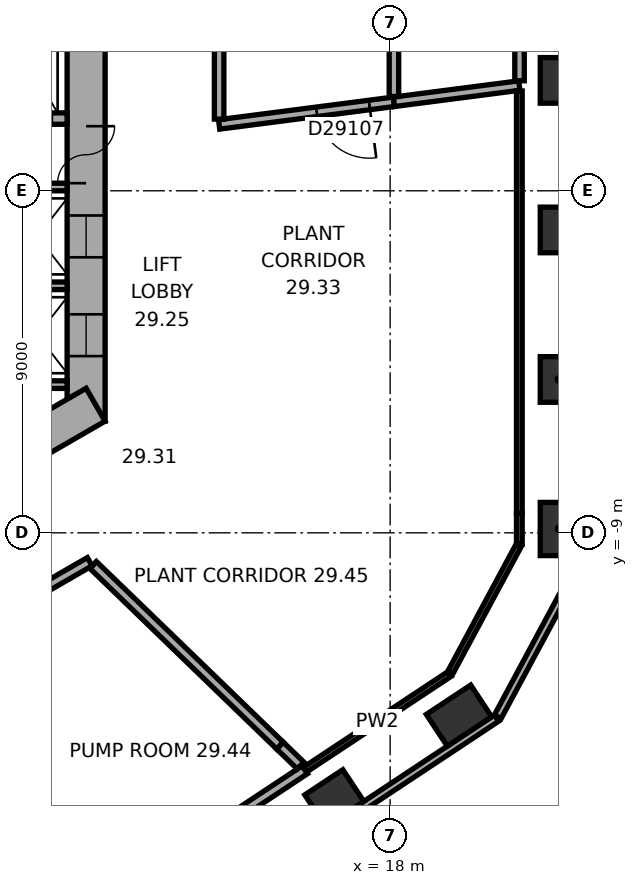
"""IFC4 building model, lengths in metres.
Left out: names, types, materials, properties, quantities, classifications, styles, units other than length and angle.
Written with IfcOpenShell. Run it as: python <this file> out.ifc"""

import sys

from ifc_helpers import new_model, si_unit, direction, frame, frame_2d, origin, origin_2d, place, context, subcontext, project, spatial, rectangle, extrude, element, fill, save


model = new_model("IFC4")
c1 = context("Model", 3, precision=1e-05, world=origin(), true_north=direction((0.0, 1.0)))
c2 = subcontext(c1, "Body", "Model", "MODEL_VIEW")
j1 = project(units=[si_unit("LENGTHUNIT", "METRE"), si_unit("PLANEANGLEUNIT", "RADIAN")], contexts=[c1])
p1 = place(None, origin())
s1 = spatial("IfcSite", under=j1, at=p1, CompositionType="ELEMENT")
p2 = place(p1, origin())
s2 = spatial("IfcBuilding", under=s1, at=p2, CompositionType="ELEMENT")
p3 = place(p2, frame((0.0, 0.0, 119.9)))
s3 = spatial("IfcBuildingStorey", under=s2, at=p3, CompositionType="ELEMENT", Elevation=119.9)
p4 = place(p3, frame((22.45, -8.899, 0.0), z_axis=(0.0, 0.0, 1.0), x_axis=(0.0, 1.0, 0.0)))
e1 = element("IfcColumn", 1, at=p4, inside=s3, PredefinedType="COLUMN", context=c2, shape_type="SweptSolid", body=[
    extrude(rectangle(XDim=1.4, YDim=1.0, at=origin_2d()), origin(), (0.0, 0.0, 1.0), 4.5),
])
for number, where, z_axis, x_axis in (
    (2, (22.45, -4.965, 0.0), (0.0, 0.0, 1.0), (0.0, 1.0, 0.0)),
    (3, (22.45, -1.03, 0.0), (0.0, 0.0, 1.0), (0.0, 1.0, 0.0)),
    (4, (22.45, 2.905, 0.0), (0.0, 0.0, 1.0), (0.0, 1.0, 0.0)),
    (5, (16.531, -15.981, 0.0), (0.0, 0.0, 1.0), (0.834, 0.552, 0.0)),
):
    element("IfcColumn", number, at=place(p3, frame(where, z_axis=z_axis, x_axis=x_axis)), inside=s3, PredefinedType="COLUMN", context=c2, shape_type="SweptSolid", body=[
        extrude(rectangle(XDim=1.2, YDim=1.0, at=origin_2d()), origin(), (0.0, 0.0, 1.0), 4.5),
    ])
p5 = place(p3, frame((19.812, -13.809, 0.0), z_axis=(0.0, 0.0, 1.0), x_axis=(0.833885822067, 0.551936985312, 0.0)))
e6 = element("IfcColumn", 6, at=p5, inside=s3, PredefinedType="COLUMN", context=c2, shape_type="SweptSolid", body=[
    extrude(rectangle(XDim=1.4, YDim=1.0, at=origin_2d()), origin(), (0.0, 0.0, 1.0), 4.5),
])
p6 = place(p3, frame((10.0, -6.062, 0.0), z_axis=(0.0, 0.0, 1.0), x_axis=(0.0, 1.0, 0.0)))
e7 = element("IfcWall", 7, at=p6, inside=s3, PredefinedType="SHEAR", context=c2, shape_type="SweptSolid", body=[
    extrude(rectangle(XDim=12.125, YDim=1.0, at=frame_2d((6.062, 0.0))), origin(), (0.0, 0.0, 1.0), 4.5),
])
p7 = place(p6, frame((6.262, 0.0, 0.0)))
e8 = element("IfcOpeningElement", 8, at=p7, cuts=e7, PredefinedType="OPENING", context=c2, shape_type="SweptSolid", body=[
    extrude(rectangle(XDim=1.5, YDim=2.1, at=frame_2d((0.75, 1.05))), frame((0.0, 0.51, 0.0), z_axis=(0.0, -1.0, 0.0), x_axis=(1.0, 0.0, 0.0)), (0.0, 0.0, 1.0), 1.02),
])
p8 = place(p6, frame((1.712, 0.0, 0.0)))
e9 = element("IfcOpeningElement", 9, at=p8, cuts=e7, PredefinedType="OPENING", context=c2, shape_type="SweptSolid", body=[
    extrude(rectangle(XDim=1.1, YDim=2.1, at=frame_2d((0.55, 1.05))), frame((0.0, 0.51, 0.0), z_axis=(0.0, -1.0, 0.0), x_axis=(1.0, 0.0, 0.0)), (0.0, 0.0, 1.0), 1.02),
])
p9 = place(p6, frame((4.312, 0.0, 0.0)))
e10 = element("IfcOpeningElement", 10, at=p9, cuts=e7, PredefinedType="OPENING", context=c2, shape_type="SweptSolid", body=[
    extrude(rectangle(XDim=1.1, YDim=2.1, at=frame_2d((0.55, 1.05))), frame((0.0, 0.51, 0.0), z_axis=(0.0, -1.0, 0.0), x_axis=(1.0, 0.0, 0.0)), (0.0, 0.0, 1.0), 1.02),
])
p10 = place(p3, frame((-0.25, -11.691, 0.0), z_axis=(0.0, 0.0, 1.0), x_axis=(0.866022616891, 0.50000482701, 0.0)))
e11 = element("IfcWall", 11, at=p10, inside=s3, PredefinedType="SHEAR", context=c2, shape_type="SweptSolid", body=[
    extrude(rectangle(XDim=12.125, YDim=1.0, at=frame_2d((6.062, 0.0))), origin(), (0.0, 0.0, 1.0), 4.5),
])
p11 = place(p10, frame((2.712, 0.0, 0.0)))
e12 = element("IfcOpeningElement", 12, at=p11, cuts=e11, PredefinedType="OPENING", context=c2, shape_type="SweptSolid", body=[
    extrude(rectangle(XDim=0.9, YDim=2.1, at=frame_2d((0.45, 1.05))), frame((0.0, 0.51, 0.0), z_axis=(0.0, -1.0, 0.0), x_axis=(1.0, 0.0, 0.0)), (0.0, 0.0, 1.0), 1.02),
])
p12 = place(p10, frame((5.312, 0.0, 0.0)))
e13 = element("IfcOpeningElement", 13, at=p12, cuts=e11, PredefinedType="OPENING", context=c2, shape_type="SweptSolid", body=[
    extrude(rectangle(XDim=0.9, YDim=2.1, at=frame_2d((0.45, 1.05))), frame((0.0, 0.51, 0.0), z_axis=(0.0, -1.0, 0.0), x_axis=(1.0, 0.0, 0.0)), (0.0, 0.0, 1.0), 1.02),
])
p13 = place(p10, frame((7.812, 0.0, 0.0)))
e14 = element("IfcOpeningElement", 14, at=p13, cuts=e11, PredefinedType="OPENING", context=c2, shape_type="SweptSolid", body=[
    extrude(rectangle(XDim=1.1, YDim=2.1, at=frame_2d((0.55, 1.05))), frame((0.0, 0.51, 0.0), z_axis=(0.0, -1.0, 0.0), x_axis=(1.0, 0.0, 0.0)), (0.0, 0.0, 1.0), 1.02),
])
p14 = place(p3, frame((3.083, -25.601, 0.0), z_axis=(0.0, 0.0, 1.0), x_axis=(0.833884295743, 0.551939291329, 0.0)))
e15 = element("IfcWall", 15, at=p14, inside=s3, PredefinedType="STANDARD", context=c2, shape_type="SweptSolid", body=[
    extrude(rectangle(XDim=21.246, YDim=0.2, at=frame_2d((10.623, 0.0))), origin(), (0.0, 0.0, 1.0), 4.5),
])
p15 = place(p3, frame((20.833, -13.839, 0.0), z_axis=(0.0, 0.0, 1.0), x_axis=(0.473321668581, 0.880889662813, 0.0)))
e16 = element("IfcWall", 16, at=p15, inside=s3, PredefinedType="STANDARD", context=c2, shape_type="SweptSolid", body=[
    extrude(rectangle(XDim=4.66, YDim=0.2, at=frame_2d((2.33, 0.0))), origin(), (0.0, 0.0, 1.0), 4.5),
])
for number, where, z_axis, x_axis in (
    (17, (7.3, -5.1, 0.0), (0.0, 0.0, 1.0), (1.0, 0.0, 0.0)),
    (18, (7.3, -2.5, 0.0), (0.0, 0.0, 1.0), (1.0, 0.0, 0.0)),
    (19, (7.3, 0.1, 0.0), (0.0, 0.0, 1.0), (1.0, 0.0, 0.0)),
):
    element("IfcWall", number, at=place(p3, frame(where, z_axis=z_axis, x_axis=x_axis)), inside=s3, PredefinedType="PARTITIONING", context=c2, shape_type="SweptSolid", body=[
        extrude(rectangle(XDim=2.2, YDim=0.2, at=frame_2d((1.1, 0.0))), origin(), (0.0, 0.0, 1.0), 4.22),
    ])
p16 = place(p3, frame((7.3, 1.9, 0.0), z_axis=(0.0, 0.0, 1.0), x_axis=(1.0, 0.0, 0.0)))
e20 = element("IfcWall", 20, at=p16, inside=s3, PredefinedType="SHEAR", context=c2, shape_type="SweptSolid", body=[
    extrude(rectangle(XDim=2.2, YDim=0.3, at=frame_2d((1.1, 0.0))), origin(), (0.0, 0.0, 1.0), 4.22),
])
p17 = place(p16, frame((0.7, 0.0, 0.0)))
e21 = element("IfcOpeningElement", 21, at=p17, cuts=e20, PredefinedType="OPENING", context=c2, shape_type="SweptSolid", body=[
    extrude(rectangle(XDim=1.1, YDim=2.1, at=frame_2d((0.55, 1.05))), frame((0.0, 0.16, 0.0), z_axis=(0.0, -1.0, 0.0), x_axis=(1.0, 0.0, 0.0)), (0.0, 0.0, 1.0), 0.32),
])
p18 = place(p3, frame((15.758, -15.233, 0.0), z_axis=(0.0, 0.0, 1.0), x_axis=(-0.83385397802, -0.551985093403, 0.0)))
e22 = element("IfcWall", 22, at=p18, inside=s3, PredefinedType="SOLIDWALL", context=c2, shape_type="SweptSolid", body=[
    extrude(rectangle(XDim=7.499, YDim=0.25, at=frame_2d((3.75, 0.0))), origin(), (0.0, 0.0, 1.0), 3.72),
])
p19 = place(p3, frame((15.101, -14.598, 0.0), z_axis=(0.0, 0.0, 1.0), x_axis=(0.718831874795, -0.695183958229, 0.0)))
e23 = element("IfcWall", 23, at=p19, inside=s3, PredefinedType="SOLIDWALL", context=c2, shape_type="SweptSolid", body=[
    extrude(rectangle(XDim=0.754, YDim=0.25, at=frame_2d((0.377, 0.0))), origin(), (0.0, 0.0, 1.0), 3.2),
])
p20 = place(p3, frame((15.101, -14.598, 0.0), z_axis=(0.0, 0.0, 1.0), x_axis=(-0.718943789633, 0.695068217766, 0.0)))
e24 = element("IfcWall", 24, at=p20, inside=s3, PredefinedType="SOLIDWALL", context=c2, shape_type="SweptSolid", body=[
    extrude(rectangle(XDim=6.841, YDim=0.25, at=frame_2d((3.42, 0.0))), origin(), (0.0, 0.0, 1.0), 3.2),
])
p21 = place(p3, frame((19.563, -12.714, 0.0), z_axis=(0.0, 0.0, 1.0), x_axis=(-0.833913741114, -0.551894801916, 0.0)))
e25 = element("IfcWall", 25, at=p21, inside=s3, PredefinedType="PARTITIONING", context=c2, shape_type="SweptSolid", body=[
    extrude(rectangle(XDim=4.564, YDim=0.15, at=frame_2d((2.282, 0.0))), origin(), (0.0, 0.0, 1.0), 3.72),
])
p22 = place(p3, frame((7.269, -11.391, 0.0), z_axis=(0.0, 0.0, 1.0), x_axis=(0.866043587326, 0.49996850386, 0.0)))
e26 = element("IfcWall", 26, at=p22, inside=s3, PredefinedType="SOLIDWALL", context=c2, shape_type="SweptSolid", body=[
    extrude(rectangle(XDim=3.264, YDim=0.25, at=frame_2d((1.632, 0.0))), origin(), (0.0, 0.0, 1.0), 4.22),
])
p23 = place(p22, frame((0.25, 0.0, 0.0)))
e27 = element("IfcOpeningElement", 27, at=p23, cuts=e26, PredefinedType="OPENING", context=c2, shape_type="SweptSolid", body=[
    extrude(rectangle(XDim=1.4, YDim=2.1, at=frame_2d((0.7, 1.05))), frame((0.0, 0.135, 0.0), z_axis=(0.0, -1.0, 0.0), x_axis=(1.0, 0.0, 0.0)), (0.0, 0.0, 1.0), 0.27),
])
p24 = place(p3, frame((21.381, -9.332, 0.0), z_axis=(0.0, 0.0, 1.0), x_axis=(-0.473363971323, -0.880866931297, 0.0)))
e28 = element("IfcWall", 28, at=p24, inside=s3, PredefinedType="PARTITIONING", context=c2, shape_type="SweptSolid", body=[
    extrude(rectangle(XDim=3.8, YDim=0.15, at=frame_2d((1.9, 0.0))), origin(), (0.0, 0.0, 1.0), 4.22),
])
p25 = place(p3, frame((21.4, -8.483, 0.0), z_axis=(0.0, 0.0, 1.0), x_axis=(0.0, -1.0, 0.0)))
e29 = element("IfcWall", 29, at=p25, inside=s3, PredefinedType="PARTITIONING", context=c2, shape_type="SweptSolid", body=[
    extrude(rectangle(XDim=0.813, YDim=0.15, at=frame_2d((0.407, 0.0))), origin(), (0.0, 0.0, 1.0), 4.22),
])
p26 = place(p3, frame((18.1, 2.342, 0.0), z_axis=(0.0, 0.0, 1.0), x_axis=(-0.991739248087, -0.128270276382, 0.0)))
e30 = element("IfcWall", 30, at=p26, inside=s3, PredefinedType="SOLIDWALL", context=c2, shape_type="SweptSolid", body=[
    extrude(rectangle(XDim=4.638, YDim=0.25, at=frame_2d((2.319, 0.0))), origin(), (0.0, 0.0, 1.0), 3.2),
])
p27 = place(p26, frame((0.65, 0.0, 0.0)))
e31 = element("IfcOpeningElement", 31, at=p27, cuts=e30, PredefinedType="OPENING", context=c2, shape_type="SweptSolid", body=[
    extrude(rectangle(XDim=1.4, YDim=2.1, at=frame_2d((0.7, 1.05))), frame((0.0, 0.135, 0.0), z_axis=(0.0, -1.0, 0.0), x_axis=(1.0, 0.0, 0.0)), (0.0, 0.0, 1.0), 0.27),
])
p28 = place(p3, frame((18.1, 2.342, 0.0), z_axis=(0.0, 0.0, 1.0), x_axis=(0.99173002922, 0.128341533193, 0.0)))
e32 = element("IfcWall", 32, at=p28, inside=s3, PredefinedType="SOLIDWALL", context=c2, shape_type="SweptSolid", body=[
    extrude(rectangle(XDim=3.327, YDim=0.25, at=frame_2d((1.664, 0.0))), origin(), (0.0, 0.0, 1.0), 3.2),
])
p29 = place(p3, frame((21.4, 2.626, 0.0), z_axis=(0.0, 0.0, 1.0), x_axis=(0.0, -1.0, 0.0)))
e33 = element("IfcWall", 33, at=p29, inside=s3, PredefinedType="PARTITIONING", context=c2, shape_type="SweptSolid", body=[
    extrude(rectangle(XDim=11.109, YDim=0.15, at=frame_2d((5.554, 0.0))), origin(), (0.0, 0.0, 1.0), 3.72),
])
p30 = place(p3, frame((13.5, 7.694, 0.0), z_axis=(0.0, 0.0, 1.0), x_axis=(0.0, -1.0, 0.0)))
e34 = element("IfcWall", 34, at=p30, inside=s3, PredefinedType="SOLIDWALL", context=c2, shape_type="SweptSolid", body=[
    extrude(rectangle(XDim=5.808, YDim=0.25, at=frame_2d((2.904, 0.0))), origin(), (0.0, 0.0, 1.0), 4.22),
])
p31 = place(p3, frame((18.1, 10.35, 0.0), z_axis=(0.0, 0.0, 1.0), x_axis=(0.0, -1.0, 0.0)))
e35 = element("IfcWall", 35, at=p31, inside=s3, PredefinedType="SOLIDWALL", context=c2, shape_type="SweptSolid", body=[
    extrude(rectangle(XDim=7.868, YDim=0.25, at=frame_2d((3.934, 0.0))), origin(), (0.0, 0.0, 1.0), 4.22),
])
p32 = place(p3, frame((21.405, 11.117, 0.0), z_axis=(0.0, 0.0, 1.0), x_axis=(0.0, -1.0, 0.0)))
e36 = element("IfcWall", 36, at=p32, inside=s3, PredefinedType="SOLIDWALL", context=c2, shape_type="SweptSolid", body=[
    extrude(rectangle(XDim=8.222, YDim=0.25, at=frame_2d((4.111, 0.0))), origin(), (0.0, 0.0, 1.0), 3.72),
])
p33 = place(p7, origin())
e37 = element("IfcDoor", 37, at=p33, inside=s3, OperationType="DOUBLE_DOOR_SINGLE_SWING", PredefinedType="DOOR", context=c2, shape_type="SweptSolid", body=[
    extrude(rectangle(XDim=1.5, YDim=2.1, at=frame_2d((0.75, 1.05))), frame((0.0, 0.025, 0.0), z_axis=(0.0, -1.0, 0.0), x_axis=(1.0, 0.0, 0.0)), (0.0, 0.0, 1.0), 0.05),
])
fill(e8, e37)
p34 = place(p17, origin())
e38 = element("IfcDoor", 38, at=p34, inside=s3, OperationType="DOUBLE_DOOR_SLIDING", PredefinedType="DOOR", context=c2, shape_type="SweptSolid", body=[
    extrude(rectangle(XDim=1.1, YDim=2.1, at=frame_2d((0.55, 1.05))), frame((0.0, 0.025, 0.0), z_axis=(0.0, -1.0, 0.0), x_axis=(1.0, 0.0, 0.0)), (0.0, 0.0, 1.0), 0.05),
])
fill(e21, e38)
p35 = place(p8, origin())
e39 = element("IfcDoor", 39, at=p35, inside=s3, OperationType="DOUBLE_DOOR_SLIDING", PredefinedType="DOOR", context=c2, shape_type="SweptSolid", body=[
    extrude(rectangle(XDim=1.1, YDim=2.1, at=frame_2d((0.55, 1.05))), frame((0.0, 0.025, 0.0), z_axis=(0.0, -1.0, 0.0), x_axis=(1.0, 0.0, 0.0)), (0.0, 0.0, 1.0), 0.05),
])
fill(e9, e39)
p36 = place(p9, origin())
e40 = element("IfcDoor", 40, at=p36, inside=s3, OperationType="DOUBLE_DOOR_SLIDING", PredefinedType="DOOR", context=c2, shape_type="SweptSolid", body=[
    extrude(rectangle(XDim=1.1, YDim=2.1, at=frame_2d((0.55, 1.05))), frame((0.0, 0.025, 0.0), z_axis=(0.0, -1.0, 0.0), x_axis=(1.0, 0.0, 0.0)), (0.0, 0.0, 1.0), 0.05),
])
fill(e10, e40)
p37 = place(p27, origin())
e41 = element("IfcDoor", 41, at=p37, inside=s3, OperationType="SINGLE_SWING_LEFT", PredefinedType="DOOR", context=c2, shape_type="SweptSolid", body=[
    extrude(rectangle(XDim=1.4, YDim=2.1, at=frame_2d((0.7, 1.05))), frame((0.0, 0.025, 0.0), z_axis=(0.0, -1.0, 0.0), x_axis=(1.0, 0.0, 0.0)), (0.0, 0.0, 1.0), 0.05),
])
fill(e31, e41)
save(model, sys.argv[1])
